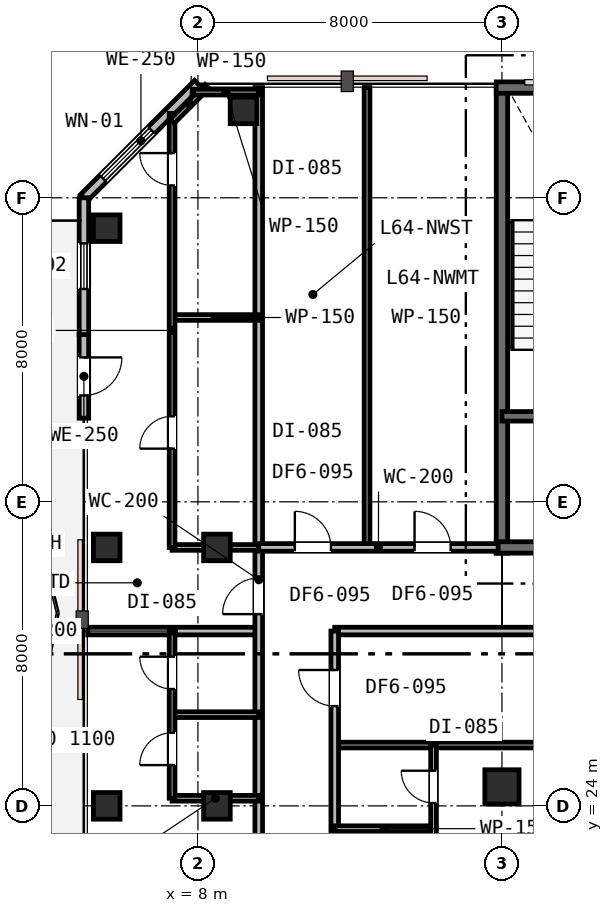
"""IFC4 building model, lengths in metres.
Left out: names, types, materials, properties, quantities, classifications, styles, units other than length and angle.
Written with IfcOpenShell. Run it as: python <this file> out.ifc"""

import sys

from ifc_helpers import new_model, si_unit, direction, frame, frame_2d, origin, origin_2d, place, context, subcontext, project, spatial, rectangle, extrude, element, fill, save


model = new_model("IFC4")
c1 = context("Model", 3, precision=1e-05, world=origin(), true_north=direction((0.0, 1.0)))
c2 = subcontext(c1, "Body", "Model", "MODEL_VIEW")
j1 = project(units=[si_unit("LENGTHUNIT", "METRE"), si_unit("PLANEANGLEUNIT", "RADIAN")], contexts=[c1])
p1 = place(None, origin())
s1 = spatial("IfcSite", under=j1, at=p1, CompositionType="ELEMENT")
p2 = place(p1, origin())
s2 = spatial("IfcBuilding", under=s1, at=p2, CompositionType="ELEMENT")
p3 = place(p2, frame((0.0, 0.0, 248.8)))
s3 = spatial("IfcBuildingStorey", under=s2, at=p3, CompositionType="ELEMENT", Elevation=248.8)
p4 = place(p3, frame((16.0, 30.65, 0.0), z_axis=(0.0, 0.0, 1.0), x_axis=(0.0, 1.0, 0.0)))
e1 = element("IfcWall", 1, at=p4, inside=s3, PredefinedType="SHEAR", context=c2, shape_type="SweptSolid", body=[
    extrude(rectangle(XDim=12.3, YDim=0.3, at=frame_2d((6.15, 0.0))), origin(), (0.0, 0.0, 1.0), 3.8),
])
p5 = place(p3, frame((15.85, 42.9, 0.0), z_axis=(0.0, 0.0, 1.0), x_axis=(1.0, 0.0, 0.0)))
e2 = element("IfcWall", 2, at=p5, inside=s3, PredefinedType="SHEAR", context=c2, shape_type="SweptSolid", body=[
    extrude(rectangle(XDim=24.3, YDim=0.3, at=frame_2d((12.15, 0.0))), origin(), (0.0, 0.0, 1.0), 3.8),
])
p6 = place(p3, frame((15.85, 30.8, 0.0), z_axis=(0.0, 0.0, 1.0), x_axis=(1.0, 0.0, 0.0)))
e3 = element("IfcWall", 3, at=p6, inside=s3, PredefinedType="SHEAR", context=c2, shape_type="SweptSolid", body=[
    extrude(rectangle(XDim=11.2, YDim=0.3, at=frame_2d((5.6, 0.0))), origin(), (0.0, 0.0, 1.0), 3.8),
])
p7 = place(p6, frame((2.45, 0.0, 0.0)))
e4 = element("IfcOpeningElement", 4, at=p7, cuts=e3, PredefinedType="OPENING", context=c2, shape_type="SweptSolid", body=[
    extrude(rectangle(XDim=1.1, YDim=2.15, at=frame_2d((0.55, 1.075))), frame((0.0, 0.16, 0.0), z_axis=(0.0, -1.0, 0.0), x_axis=(1.0, 0.0, 0.0)), (0.0, 0.0, 1.0), 0.32),
])
p8 = place(p3, frame((16.0, 34.25, 0.0), z_axis=(0.0, 0.0, 1.0), x_axis=(1.0, 0.0, 0.0)))
e5 = element("IfcWall", 5, at=p8, inside=s3, PredefinedType="SHEAR", context=c2, shape_type="SweptSolid", body=[
    extrude(rectangle(XDim=6.05, YDim=0.25, at=frame_2d((3.025, 0.0))), origin(), (0.0, 0.0, 1.0), 3.8),
])
p9 = place(p8, frame((1.25, 0.0, 0.0)))
e6 = element("IfcOpeningElement", 6, at=p9, cuts=e5, PredefinedType="OPENING", context=c2, shape_type="SweptSolid", body=[
    extrude(rectangle(XDim=1.0, YDim=2.15, at=frame_2d((0.5, 1.075))), frame((0.0, 0.135, 0.0), z_axis=(0.0, -1.0, 0.0), x_axis=(1.0, 0.0, 0.0)), (0.0, 0.0, 1.0), 0.27),
])
p10 = place(p8, frame((4.2, 0.0, 0.0)))
e7 = element("IfcOpeningElement", 7, at=p10, cuts=e5, PredefinedType="OPENING", context=c2, shape_type="SweptSolid", body=[
    extrude(rectangle(XDim=1.1, YDim=2.15, at=frame_2d((0.55, 1.075))), frame((0.0, 0.135, 0.0), z_axis=(0.0, -1.0, 0.0), x_axis=(1.0, 0.0, 0.0)), (0.0, 0.0, 1.0), 0.27),
])
p11 = place(p3, frame((8.5, 24.0, 0.0), z_axis=(0.0, 0.0, 1.0), x_axis=(1.0, 0.0, 0.0)))
e8 = element("IfcColumn", 8, at=p11, inside=s3, PredefinedType="COLUMN", context=c2, shape_type="SweptSolid", body=[
    extrude(rectangle(XDim=0.7, YDim=0.7, at=origin_2d()), origin(), (0.0, 0.0, 1.0), 3.8),
])
p12 = place(p3, frame((16.0, 24.5, 0.0), z_axis=(0.0, 0.0, 1.0), x_axis=(1.0, 0.0, 0.0)))
e9 = element("IfcColumn", 9, at=p12, inside=s3, PredefinedType="COLUMN", context=c2, shape_type="SweptSolid", body=[
    extrude(rectangle(XDim=0.9, YDim=0.9, at=origin_2d()), origin(), (0.0, 0.0, 1.0), 3.8),
])
for number, where, z_axis, x_axis in (
    (10, (5.6, 24.0, 0.0), (0.0, 0.0, 1.0), (1.0, 0.0, 0.0)),
    (11, (5.6, 30.8, 0.0), (0.0, 0.0, 1.0), (1.0, 0.0, 0.0)),
    (12, (5.6, 39.2, 0.0), (0.0, 0.0, 1.0), (1.0, 0.0, 0.0)),
    (13, (8.5, 30.8, 0.0), (0.0, 0.0, 1.0), (1.0, 0.0, 0.0)),
    (14, (9.2, 42.3, 0.0), (0.0, 0.0, 1.0), (1.0, 0.0, 0.0)),
):
    element("IfcColumn", number, at=place(p3, frame(where, z_axis=z_axis, x_axis=x_axis)), inside=s3, PredefinedType="COLUMN", context=c2, shape_type="SweptSolid", body=[
        extrude(rectangle(XDim=0.7, YDim=0.7, at=origin_2d()), origin(), (0.0, 0.0, 1.0), 3.8),
    ])
p13 = place(p3, frame((8.0, 43.0, 0.0), z_axis=(0.0, 0.0, 1.0), x_axis=(-0.707106781187, -0.707106781187, 0.0)))
e15 = element("IfcWall", 15, at=p13, inside=s3, PredefinedType="STANDARD", context=c2, shape_type="SweptSolid", body=[
    extrude(rectangle(XDim=4.243, YDim=0.25, at=frame_2d((2.121, 0.0))), origin(), (0.0, 0.0, 1.0), 3.53),
])
p14 = place(p13, frame((1.728, 0.0, 0.75)))
e16 = element("IfcOpeningElement", 16, at=p14, cuts=e15, PredefinedType="OPENING", context=c2, shape_type="SweptSolid", body=[
    extrude(rectangle(XDim=1.8, YDim=1.85, at=frame_2d((0.9, 0.925))), frame((0.0, 0.135, 0.0), z_axis=(0.0, -1.0, 0.0), x_axis=(1.0, 0.0, 0.0)), (0.0, 0.0, 1.0), 0.27),
])
p15 = place(p3, frame((5.0, 36.4, 0.0), z_axis=(0.0, 0.0, 1.0), x_axis=(0.0, -1.0, 0.0)))
e17 = element("IfcWall", 17, at=p15, inside=s3, PredefinedType="STANDARD", context=c2, shape_type="SweptSolid", body=[
    extrude(rectangle(XDim=2.2, YDim=0.25, at=frame_2d((1.1, 0.0))), origin(), (0.0, 0.0, 1.0), 3.53),
])
p16 = place(p15, frame((0.6, 0.0, 0.0)))
e18 = element("IfcOpeningElement", 18, at=p16, cuts=e17, PredefinedType="OPENING", context=c2, shape_type="SweptSolid", body=[
    extrude(rectangle(XDim=1.0, YDim=2.15, at=frame_2d((0.5, 1.075))), frame((0.0, 0.135, 0.0), z_axis=(0.0, -1.0, 0.0), x_axis=(1.0, 0.0, 0.0)), (0.0, 0.0, 1.0), 0.27),
])
p17 = place(p3, frame((5.0, 40.0, 0.0), z_axis=(0.0, 0.0, 1.0), x_axis=(0.0, -1.0, 0.0)))
e19 = element("IfcWall", 19, at=p17, inside=s3, PredefinedType="STANDARD", context=c2, shape_type="SweptSolid", body=[
    extrude(rectangle(XDim=3.6, YDim=0.25, at=frame_2d((1.8, 0.0))), origin(), (0.0, 0.0, 1.0), 3.53),
])
p18 = place(p17, frame((1.2, 0.0, 0.85)))
e20 = element("IfcOpeningElement", 20, at=p18, cuts=e19, PredefinedType="OPENING", context=c2, shape_type="SweptSolid", body=[
    extrude(rectangle(XDim=1.2, YDim=1.6, at=frame_2d((0.6, 0.8))), frame((0.0, 0.135, 0.0), z_axis=(0.0, -1.0, 0.0), x_axis=(1.0, 0.0, 0.0)), (0.0, 0.0, 1.0), 0.27),
])
p19 = place(p3, frame((5.1, 28.6, 0.0), z_axis=(0.0, 0.0, 1.0), x_axis=(1.0, 0.0, 0.0)))
e21 = element("IfcWall", 21, at=p19, inside=s3, PredefinedType="PARTITIONING", context=c2, shape_type="SweptSolid", body=[
    extrude(rectangle(XDim=4.5, YDim=0.2, at=frame_2d((2.25, 0.0))), origin(), (0.0, 0.0, 1.0), 3.16),
])
p20 = place(p3, frame((11.6, 28.6, 0.0), z_axis=(0.0, 0.0, 1.0), x_axis=(1.0, 0.0, 0.0)))
e22 = element("IfcWall", 22, at=p20, inside=s3, PredefinedType="PARTITIONING", context=c2, shape_type="SweptSolid", body=[
    extrude(rectangle(XDim=34.3, YDim=0.2, at=frame_2d((17.15, 0.0))), origin(), (0.0, 0.0, 1.0), 3.16),
])
p21 = place(p20, frame((14.625, 0.0, 0.0)))
e23 = element("IfcOpeningElement", 23, at=p21, cuts=e22, PredefinedType="OPENING", context=c2, shape_type="SweptSolid", body=[
    extrude(rectangle(XDim=0.95, YDim=2.15, at=frame_2d((0.475, 1.075))), frame((0.0, 0.11, 0.0), z_axis=(0.0, -1.0, 0.0), x_axis=(1.0, 0.0, 0.0)), (0.0, 0.0, 1.0), 0.22),
])
p22 = place(p20, frame((26.225, 0.0, 0.0)))
e24 = element("IfcOpeningElement", 24, at=p22, cuts=e22, PredefinedType="OPENING", context=c2, shape_type="SweptSolid", body=[
    extrude(rectangle(XDim=0.95, YDim=2.15, at=frame_2d((0.475, 1.075))), frame((0.0, 0.11, 0.0), z_axis=(0.0, -1.0, 0.0), x_axis=(1.0, 0.0, 0.0)), (0.0, 0.0, 1.0), 0.22),
])
p23 = place(p3, frame((9.6, 17.0, 0.0), z_axis=(0.0, 0.0, 1.0), x_axis=(0.0, 1.0, 0.0)))
e25 = element("IfcWall", 25, at=p23, inside=s3, PredefinedType="PARTITIONING", context=c2, shape_type="SweptSolid", body=[
    extrude(rectangle(XDim=25.9, YDim=0.2, at=frame_2d((12.95, 0.0))), origin(), (0.0, 0.0, 1.0), 3.16),
])
p24 = place(p23, frame((12.045, 0.0, 0.0)))
e26 = element("IfcOpeningElement", 26, at=p24, cuts=e25, PredefinedType="OPENING", context=c2, shape_type="SweptSolid", body=[
    extrude(rectangle(XDim=0.95, YDim=2.15, at=frame_2d((0.475, 1.075))), frame((0.0, 0.11, 0.0), z_axis=(0.0, -1.0, 0.0), x_axis=(1.0, 0.0, 0.0)), (0.0, 0.0, 1.0), 0.22),
])
p25 = place(p23, frame((3.125, 0.0, 0.0)))
e27 = element("IfcOpeningElement", 27, at=p25, cuts=e25, PredefinedType="OPENING", context=c2, shape_type="SweptSolid", body=[
    extrude(rectangle(XDim=0.95, YDim=2.15, at=frame_2d((0.475, 1.075))), frame((0.0, 0.11, 0.0), z_axis=(0.0, -1.0, 0.0), x_axis=(1.0, 0.0, 0.0)), (0.0, 0.0, 1.0), 0.22),
])
p26 = place(p3, frame((7.32, 30.8, 0.0), z_axis=(0.0, 0.0, 1.0), x_axis=(1.0, 0.0, 0.0)))
e28 = element("IfcWall", 28, at=p26, inside=s3, PredefinedType="PARTITIONING", context=c2, shape_type="SweptSolid", body=[
    extrude(rectangle(XDim=2.28, YDim=0.15, at=frame_2d((1.14, 0.0))), origin(), (0.0, 0.0, 1.0), 3.16),
])
p27 = place(p3, frame((7.32, 36.85, 0.0), z_axis=(0.0, 0.0, 1.0), x_axis=(1.0, 0.0, 0.0)))
e29 = element("IfcWall", 29, at=p27, inside=s3, PredefinedType="PARTITIONING", context=c2, shape_type="SweptSolid", body=[
    extrude(rectangle(XDim=2.28, YDim=0.15, at=frame_2d((1.14, 0.0))), origin(), (0.0, 0.0, 1.0), 3.53),
])
p28 = place(p3, frame((7.32, 30.8, 0.0), z_axis=(0.0, 0.0, 1.0), x_axis=(0.0, 1.0, 0.0)))
e30 = element("IfcWall", 30, at=p28, inside=s3, PredefinedType="PARTITIONING", context=c2, shape_type="SweptSolid", body=[
    extrude(rectangle(XDim=11.42, YDim=0.15, at=frame_2d((5.71, 0.0))), origin(), (0.0, 0.0, 1.0), 3.16),
])
p29 = place(p28, frame((2.6, 0.0, 0.0)))
e31 = element("IfcOpeningElement", 31, at=p29, cuts=e30, PredefinedType="OPENING", context=c2, shape_type="SweptSolid", body=[
    extrude(rectangle(XDim=0.85, YDim=2.15, at=frame_2d((0.425, 1.075))), frame((0.0, 0.085, 0.0), z_axis=(0.0, -1.0, 0.0), x_axis=(1.0, 0.0, 0.0)), (0.0, 0.0, 1.0), 0.17),
])
p30 = place(p28, frame((9.526, 0.0, 0.0)))
e32 = element("IfcOpeningElement", 32, at=p30, cuts=e30, PredefinedType="OPENING", context=c2, shape_type="SweptSolid", body=[
    extrude(rectangle(XDim=0.85, YDim=2.15, at=frame_2d((0.425, 1.075))), frame((0.0, 0.085, 0.0), z_axis=(0.0, -1.0, 0.0), x_axis=(1.0, 0.0, 0.0)), (0.0, 0.0, 1.0), 0.17),
])
p31 = place(p3, frame((7.32, 42.009, 0.0), z_axis=(0.0, 0.0, 1.0), x_axis=(0.707106781187, 0.707106781187, 0.0)))
e33 = element("IfcWall", 33, at=p31, inside=s3, PredefinedType="PARTITIONING", context=c2, shape_type="SweptSolid", body=[
    extrude(rectangle(XDim=1.302, YDim=0.15, at=frame_2d((0.651, 0.0))), origin(), (0.0, 0.0, 1.0), 3.53),
])
p32 = place(p3, frame((7.88, 42.78, 0.0), z_axis=(0.0, 0.0, 1.0), x_axis=(1.0, 0.0, 0.0)))
e34 = element("IfcWall", 34, at=p32, inside=s3, PredefinedType="PARTITIONING", context=c2, shape_type="SweptSolid", body=[
    extrude(rectangle(XDim=1.72, YDim=0.15, at=frame_2d((0.86, 0.0))), origin(), (0.0, 0.0, 1.0), 3.27),
])
p33 = place(p3, frame((12.45, 30.8, 0.0), z_axis=(0.0, 0.0, 1.0), x_axis=(0.0, 1.0, 0.0)))
e35 = element("IfcWall", 35, at=p33, inside=s3, PredefinedType="PARTITIONING", context=c2, shape_type="SweptSolid", body=[
    extrude(rectangle(XDim=12.1, YDim=0.15, at=frame_2d((6.05, 0.0))), origin(), (0.0, 0.0, 1.0), 3.16),
])
p34 = place(p3, frame((9.6, 30.8, 0.0), z_axis=(0.0, 0.0, 1.0), x_axis=(1.0, 0.0, 0.0)))
e36 = element("IfcWall", 36, at=p34, inside=s3, PredefinedType="PARTITIONING", context=c2, shape_type="SweptSolid", body=[
    extrude(rectangle(XDim=6.3, YDim=0.2, at=frame_2d((3.15, 0.0))), origin(), (0.0, 0.0, 1.0), 3.16),
])
p35 = place(p34, frame((0.95, 0.0, 0.0)))
e37 = element("IfcOpeningElement", 37, at=p35, cuts=e36, PredefinedType="OPENING", context=c2, shape_type="SweptSolid", body=[
    extrude(rectangle(XDim=0.95, YDim=2.15, at=frame_2d((0.475, 1.075))), frame((0.0, 0.11, 0.0), z_axis=(0.0, -1.0, 0.0), x_axis=(1.0, 0.0, 0.0)), (0.0, 0.0, 1.0), 0.22),
])
p36 = place(p34, frame((4.1, 0.0, 0.0)))
e38 = element("IfcOpeningElement", 38, at=p36, cuts=e36, PredefinedType="OPENING", context=c2, shape_type="SweptSolid", body=[
    extrude(rectangle(XDim=0.95, YDim=2.15, at=frame_2d((0.475, 1.075))), frame((0.0, 0.11, 0.0), z_axis=(0.0, -1.0, 0.0), x_axis=(1.0, 0.0, 0.0)), (0.0, 0.0, 1.0), 0.22),
])
for number, where, z_axis, x_axis in (
    (39, (7.32, 24.2, 0.0), (0.0, 0.0, 1.0), (1.0, 0.0, 0.0)),
    (40, (7.32, 26.4, 0.0), (0.0, 0.0, 1.0), (1.0, 0.0, 0.0)),
):
    element("IfcWall", number, at=place(p3, frame(where, z_axis=z_axis, x_axis=x_axis)), inside=s3, PredefinedType="PARTITIONING", context=c2, shape_type="SweptSolid", body=[
        extrude(rectangle(XDim=2.28, YDim=0.15, at=frame_2d((1.14, 0.0))), origin(), (0.0, 0.0, 1.0), 3.16),
    ])
p37 = place(p3, frame((7.32, 24.2, 0.0), z_axis=(0.0, 0.0, 1.0), x_axis=(0.0, 1.0, 0.0)))
e41 = element("IfcWall", 41, at=p37, inside=s3, PredefinedType="PARTITIONING", context=c2, shape_type="SweptSolid", body=[
    extrude(rectangle(XDim=4.4, YDim=0.15, at=frame_2d((2.2, 0.0))), origin(), (0.0, 0.0, 1.0), 3.16),
])
p38 = place(p37, frame((0.873, 0.0, 0.0)))
e42 = element("IfcOpeningElement", 42, at=p38, cuts=e41, PredefinedType="OPENING", context=c2, shape_type="SweptSolid", body=[
    extrude(rectangle(XDim=0.85, YDim=2.15, at=frame_2d((0.425, 1.075))), frame((0.0, 0.085, 0.0), z_axis=(0.0, -1.0, 0.0), x_axis=(1.0, 0.0, 0.0)), (0.0, 0.0, 1.0), 0.17),
])
p39 = place(p37, frame((2.875, 0.0, 0.0)))
e43 = element("IfcOpeningElement", 43, at=p39, cuts=e41, PredefinedType="OPENING", context=c2, shape_type="SweptSolid", body=[
    extrude(rectangle(XDim=0.85, YDim=2.15, at=frame_2d((0.425, 1.075))), frame((0.0, 0.085, 0.0), z_axis=(0.0, -1.0, 0.0), x_axis=(1.0, 0.0, 0.0)), (0.0, 0.0, 1.0), 0.17),
])
p40 = place(p3, frame((11.6, 25.6, 0.0), z_axis=(0.0, 0.0, 1.0), x_axis=(1.0, 0.0, 0.0)))
e44 = element("IfcWall", 44, at=p40, inside=s3, PredefinedType="PARTITIONING", context=c2, shape_type="SweptSolid", body=[
    extrude(rectangle(XDim=12.3, YDim=0.15, at=frame_2d((6.15, 0.0))), origin(), (0.0, 0.0, 1.0), 3.16),
])
p41 = place(p3, frame((11.6, 17.0, 0.0), z_axis=(0.0, 0.0, 1.0), x_axis=(0.0, 1.0, 0.0)))
e45 = element("IfcWall", 45, at=p41, inside=s3, PredefinedType="PARTITIONING", context=c2, shape_type="SweptSolid", body=[
    extrude(rectangle(XDim=11.6, YDim=0.2, at=frame_2d((5.8, 0.0))), origin(), (0.0, 0.0, 1.0), 3.16),
])
p42 = place(p41, frame((9.625, 0.0, 0.0)))
e46 = element("IfcOpeningElement", 46, at=p42, cuts=e45, PredefinedType="OPENING", context=c2, shape_type="SweptSolid", body=[
    extrude(rectangle(XDim=0.95, YDim=2.15, at=frame_2d((0.475, 1.075))), frame((0.0, 0.11, 0.0), z_axis=(0.0, -1.0, 0.0), x_axis=(1.0, 0.0, 0.0)), (0.0, 0.0, 1.0), 0.22),
])
p43 = place(p41, frame((1.625, 0.0, 0.0)))
e47 = element("IfcOpeningElement", 47, at=p43, cuts=e45, PredefinedType="OPENING", context=c2, shape_type="SweptSolid", body=[
    extrude(rectangle(XDim=0.95, YDim=2.15, at=frame_2d((0.475, 1.075))), frame((0.0, 0.11, 0.0), z_axis=(0.0, -1.0, 0.0), x_axis=(1.0, 0.0, 0.0)), (0.0, 0.0, 1.0), 0.22),
])
p44 = place(p3, frame((11.6, 23.4, 0.0), z_axis=(0.0, 0.0, 1.0), x_axis=(1.0, 0.0, 0.0)))
e48 = element("IfcWall", 48, at=p44, inside=s3, PredefinedType="PARTITIONING", context=c2, shape_type="SweptSolid", body=[
    extrude(rectangle(XDim=2.6, YDim=0.15, at=frame_2d((1.3, 0.0))), origin(), (0.0, 0.0, 1.0), 3.53),
])
p45 = place(p3, frame((14.2, 21.2, 0.0), z_axis=(0.0, 0.0, 1.0), x_axis=(0.0, 1.0, 0.0)))
e49 = element("IfcWall", 49, at=p45, inside=s3, PredefinedType="PARTITIONING", context=c2, shape_type="SweptSolid", body=[
    extrude(rectangle(XDim=4.4, YDim=0.15, at=frame_2d((2.2, 0.0))), origin(), (0.0, 0.0, 1.0), 3.16),
])
p46 = place(p45, frame((0.675, 0.0, 0.0)))
e50 = element("IfcOpeningElement", 50, at=p46, cuts=e49, PredefinedType="OPENING", context=c2, shape_type="SweptSolid", body=[
    extrude(rectangle(XDim=0.85, YDim=2.15, at=frame_2d((0.425, 1.075))), frame((0.0, 0.085, 0.0), z_axis=(0.0, -1.0, 0.0), x_axis=(1.0, 0.0, 0.0)), (0.0, 0.0, 1.0), 0.17),
])
p47 = place(p45, frame((2.875, 0.0, 0.0)))
e51 = element("IfcOpeningElement", 51, at=p47, cuts=e49, PredefinedType="OPENING", context=c2, shape_type="SweptSolid", body=[
    extrude(rectangle(XDim=0.85, YDim=2.15, at=frame_2d((0.425, 1.075))), frame((0.0, 0.085, 0.0), z_axis=(0.0, -1.0, 0.0), x_axis=(1.0, 0.0, 0.0)), (0.0, 0.0, 1.0), 0.17),
])
p48 = place(p14, origin())
e52 = element("IfcWindow", 52, at=p48, inside=s3, PartitioningType="SINGLE_PANEL", PredefinedType="WINDOW", context=c2, shape_type="SweptSolid", body=[
    extrude(rectangle(XDim=1.8, YDim=1.85, at=frame_2d((0.9, 0.925))), frame((0.0, 0.03, 0.0), z_axis=(0.0, -1.0, 0.0), x_axis=(1.0, 0.0, 0.0)), (0.0, 0.0, 1.0), 0.06),
])
fill(e16, e52)
p49 = place(p16, origin())
e53 = element("IfcDoor", 53, at=p49, inside=s3, OperationType="SINGLE_SWING_LEFT", PredefinedType="DOOR", context=c2, shape_type="SweptSolid", body=[
    extrude(rectangle(XDim=1.0, YDim=2.15, at=frame_2d((0.5, 1.075))), frame((0.0, 0.025, 0.0), z_axis=(0.0, -1.0, 0.0), x_axis=(1.0, 0.0, 0.0)), (0.0, 0.0, 1.0), 0.05),
])
fill(e18, e53)
p50 = place(p18, origin())
e54 = element("IfcWindow", 54, at=p50, inside=s3, PartitioningType="SINGLE_PANEL", PredefinedType="WINDOW", context=c2, shape_type="SweptSolid", body=[
    extrude(rectangle(XDim=1.2, YDim=1.6, at=frame_2d((0.6, 0.8))), frame((0.0, 0.03, 0.0), z_axis=(0.0, -1.0, 0.0), x_axis=(1.0, 0.0, 0.0)), (0.0, 0.0, 1.0), 0.06),
])
fill(e20, e54)
p51 = place(p24, origin())
e55 = element("IfcDoor", 55, at=p51, inside=s3, OperationType="SINGLE_SWING_LEFT", PredefinedType="DOOR", context=c2, shape_type="SweptSolid", body=[
    extrude(rectangle(XDim=0.95, YDim=2.15, at=frame_2d((0.475, 1.075))), frame((0.0, 0.025, 0.0), z_axis=(0.0, -1.0, 0.0), x_axis=(1.0, 0.0, 0.0)), (0.0, 0.0, 1.0), 0.05),
])
fill(e26, e55)
p52 = place(p29, origin())
e56 = element("IfcDoor", 56, at=p52, inside=s3, OperationType="SINGLE_SWING_LEFT", PredefinedType="DOOR", context=c2, shape_type="SweptSolid", body=[
    extrude(rectangle(XDim=0.85, YDim=2.15, at=frame_2d((0.425, 1.075))), frame((0.0, 0.025, 0.0), z_axis=(0.0, -1.0, 0.0), x_axis=(1.0, 0.0, 0.0)), (0.0, 0.0, 1.0), 0.05),
])
fill(e31, e56)
p53 = place(p30, origin())
e57 = element("IfcDoor", 57, at=p53, inside=s3, OperationType="SINGLE_SWING_RIGHT", PredefinedType="DOOR", context=c2, shape_type="SweptSolid", body=[
    extrude(rectangle(XDim=0.85, YDim=2.15, at=frame_2d((0.425, 1.075))), frame((0.0, 0.025, 0.0), z_axis=(0.0, -1.0, 0.0), x_axis=(1.0, 0.0, 0.0)), (0.0, 0.0, 1.0), 0.05),
])
fill(e32, e57)
p54 = place(p35, origin())
e58 = element("IfcDoor", 58, at=p54, inside=s3, OperationType="SINGLE_SWING_LEFT", PredefinedType="DOOR", context=c2, shape_type="SweptSolid", body=[
    extrude(rectangle(XDim=0.95, YDim=2.15, at=frame_2d((0.475, 1.075))), frame((0.0, 0.025, 0.0), z_axis=(0.0, -1.0, 0.0), x_axis=(1.0, 0.0, 0.0)), (0.0, 0.0, 1.0), 0.05),
])
fill(e37, e58)
p55 = place(p36, origin())
e59 = element("IfcDoor", 59, at=p55, inside=s3, OperationType="SINGLE_SWING_LEFT", PredefinedType="DOOR", context=c2, shape_type="SweptSolid", body=[
    extrude(rectangle(XDim=0.95, YDim=2.15, at=frame_2d((0.475, 1.075))), frame((0.0, 0.025, 0.0), z_axis=(0.0, -1.0, 0.0), x_axis=(1.0, 0.0, 0.0)), (0.0, 0.0, 1.0), 0.05),
])
fill(e38, e59)
p56 = place(p38, origin())
e60 = element("IfcDoor", 60, at=p56, inside=s3, OperationType="SINGLE_SWING_LEFT", PredefinedType="DOOR", context=c2, shape_type="SweptSolid", body=[
    extrude(rectangle(XDim=0.85, YDim=2.15, at=frame_2d((0.425, 1.075))), frame((0.0, 0.025, 0.0), z_axis=(0.0, -1.0, 0.0), x_axis=(1.0, 0.0, 0.0)), (0.0, 0.0, 1.0), 0.05),
])
fill(e42, e60)
p57 = place(p39, origin())
e61 = element("IfcDoor", 61, at=p57, inside=s3, OperationType="SINGLE_SWING_RIGHT", PredefinedType="DOOR", context=c2, shape_type="SweptSolid", body=[
    extrude(rectangle(XDim=0.85, YDim=2.15, at=frame_2d((0.425, 1.075))), frame((0.0, 0.025, 0.0), z_axis=(0.0, -1.0, 0.0), x_axis=(1.0, 0.0, 0.0)), (0.0, 0.0, 1.0), 0.05),
])
fill(e43, e61)
p58 = place(p42, origin())
e62 = element("IfcDoor", 62, at=p58, inside=s3, OperationType="SINGLE_SWING_RIGHT", PredefinedType="DOOR", context=c2, shape_type="SweptSolid", body=[
    extrude(rectangle(XDim=0.95, YDim=2.15, at=frame_2d((0.475, 1.075))), frame((0.0, 0.025, 0.0), z_axis=(0.0, -1.0, 0.0), x_axis=(1.0, 0.0, 0.0)), (0.0, 0.0, 1.0), 0.05),
])
fill(e46, e62)
p59 = place(p47, origin())
e63 = element("IfcDoor", 63, at=p59, inside=s3, OperationType="SINGLE_SWING_RIGHT", PredefinedType="DOOR", context=c2, shape_type="SweptSolid", body=[
    extrude(rectangle(XDim=0.85, YDim=2.15, at=frame_2d((0.425, 1.075))), frame((0.0, 0.025, 0.0), z_axis=(0.0, -1.0, 0.0), x_axis=(1.0, 0.0, 0.0)), (0.0, 0.0, 1.0), 0.05),
])
fill(e51, e63)
save(model, sys.argv[1])
